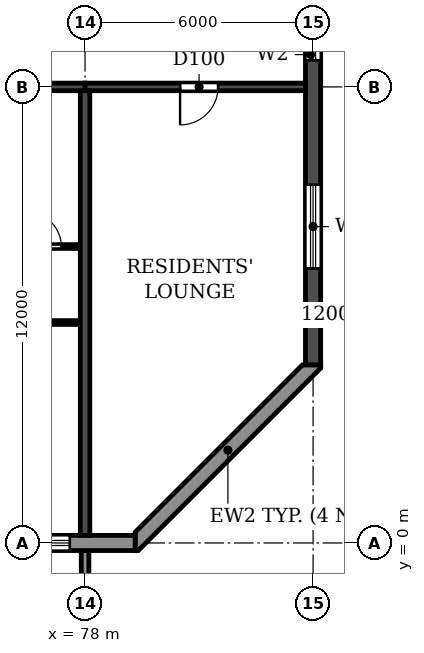
"""IFC4 building model, lengths in metres.
Left out: names, types, materials, properties, quantities, classifications, styles, units other than length and angle.
Written with IfcOpenShell. Run it as: python <this file> out.ifc"""

import sys

from ifc_helpers import new_model, si_unit, direction, frame, frame_2d, origin, place, context, subcontext, project, spatial, polyline, rectangle, outline, extrude, source, transform, mapped, element, fill, save


model = new_model("IFC4")
c1 = context("Model", 3, precision=1e-05, world=origin(), true_north=direction((0.0, 1.0)))
c2 = subcontext(c1, "Body", "Model", "MODEL_VIEW")
j1 = project(units=[si_unit("LENGTHUNIT", "METRE"), si_unit("PLANEANGLEUNIT", "RADIAN")], contexts=[c1])
p1 = place(None, origin())
s1 = spatial("IfcSite", under=j1, at=p1, CompositionType="ELEMENT")
p2 = place(p1, origin())
s2 = spatial("IfcBuilding", under=s1, at=p2, CompositionType="ELEMENT")
p3 = place(p2, frame((0.0, 0.0, 191.7)))
s3 = spatial("IfcBuildingStorey", under=s2, at=p3, CompositionType="ELEMENT", Elevation=191.7)
p4 = place(p3, frame((78.0, 0.2, 0.0), z_axis=(0.0, 0.0, 1.0), x_axis=(0.0, 1.0, 0.0)))
e1 = element("IfcWall", 1, at=p4, inside=s3, PredefinedType="SHEAR", context=c2, shape_type="SweptSolid", body=[
    extrude(rectangle(XDim=11.7, YDim=0.25, at=frame_2d((5.85, 0.0))), origin(), (0.0, 0.0, 1.0), 3.08),
])
p5 = place(p3, frame((84.0, 4.683, 0.0), z_axis=(0.0, 0.0, 1.0), x_axis=(0.0, 1.0, 0.0)))
e2 = element("IfcWall", 2, at=p5, inside=s3, PredefinedType="SHEAR", context=c2, shape_type="SweptSolid", body=[
    extrude(rectangle(XDim=31.834, YDim=0.4, at=frame_2d((15.917, 0.0))), origin(), (0.0, 0.0, 1.0), 3.08),
])
p6 = place(p5, frame((23.817, 0.0, 0.9)))
e3 = element("IfcOpeningElement", 3, at=p6, cuts=e2, PredefinedType="OPENING", context=c2, shape_type="SweptSolid", body=[
    extrude(rectangle(XDim=1.2, YDim=1.5, at=frame_2d((0.6, 0.75))), frame((0.0, 0.21, 0.0), z_axis=(0.0, -1.0, 0.0), x_axis=(1.0, 0.0, 0.0)), (0.0, 0.0, 1.0), 0.42),
])
p7 = place(p5, frame((8.017, 0.0, 0.9)))
e4 = element("IfcOpeningElement", 4, at=p7, cuts=e2, PredefinedType="OPENING", context=c2, shape_type="SweptSolid", body=[
    extrude(rectangle(XDim=1.2, YDim=1.5, at=frame_2d((0.6, 0.75))), frame((0.0, 0.21, 0.0), z_axis=(0.0, -1.0, 0.0), x_axis=(1.0, 0.0, 0.0)), (0.0, 0.0, 1.0), 0.42),
])
p8 = place(p5, frame((27.694, 0.0, 0.6)))
e5 = element("IfcOpeningElement", 5, at=p8, cuts=e2, PredefinedType="OPENING", context=c2, shape_type="SweptSolid", body=[
    extrude(rectangle(XDim=2.2, YDim=1.8, at=frame_2d((1.1, 0.9))), frame((0.0, 0.21, 0.0), z_axis=(0.0, -1.0, 0.0), x_axis=(1.0, 0.0, 0.0)), (0.0, 0.0, 1.0), 0.42),
])
p9 = place(p5, frame((2.541, 0.0, 0.6)))
e6 = element("IfcOpeningElement", 6, at=p9, cuts=e2, PredefinedType="OPENING", context=c2, shape_type="SweptSolid", body=[
    extrude(rectangle(XDim=2.2, YDim=1.8, at=frame_2d((1.1, 0.9))), frame((0.0, 0.21, 0.0), z_axis=(0.0, -1.0, 0.0), x_axis=(1.0, 0.0, 0.0)), (0.0, 0.0, 1.0), 0.42),
])
p10 = place(p5, frame((15.917, 0.0, 0.9)))
e7 = element("IfcOpeningElement", 7, at=p10, cuts=e2, PredefinedType="OPENING", context=c2, shape_type="SweptSolid", body=[
    extrude(rectangle(XDim=1.2, YDim=1.5, at=frame_2d((0.6, 0.75))), frame((0.0, 0.21, 0.0), z_axis=(0.0, -1.0, 0.0), x_axis=(1.0, 0.0, 0.0)), (0.0, 0.0, 1.0), 0.42),
])
p11 = place(p3, frame((72.0, 12.0, 0.0), z_axis=(0.0, 0.0, 1.0), x_axis=(1.0, 0.0, 0.0)))
e8 = element("IfcWall", 8, at=p11, inside=s3, PredefinedType="SHEAR", context=c2, shape_type="SweptSolid", body=[
    extrude(rectangle(XDim=6.0, YDim=0.2, at=frame_2d((3.0, 0.0))), origin(), (0.0, 0.0, 1.0), 2.48),
])
p12 = place(p11, frame((2.45, 0.0, 0.0)))
e9 = element("IfcOpeningElement", 9, at=p12, cuts=e8, PredefinedType="OPENING", context=c2, shape_type="SweptSolid", body=[
    extrude(rectangle(XDim=1.0, YDim=2.1, at=frame_2d((0.5, 1.05))), frame((0.0, 0.11, 0.0), z_axis=(0.0, -1.0, 0.0), x_axis=(1.0, 0.0, 0.0)), (0.0, 0.0, 1.0), 0.22),
])
p13 = place(p3, frame((78.0, 12.0, 0.0), z_axis=(0.0, 0.0, 1.0), x_axis=(1.0, 0.0, 0.0)))
e10 = element("IfcWall", 10, at=p13, inside=s3, PredefinedType="SHEAR", context=c2, shape_type="SweptSolid", body=[
    extrude(rectangle(XDim=5.8, YDim=0.2, at=frame_2d((2.9, 0.0))), origin(), (0.0, 0.0, 1.0), 2.48),
])
p14 = place(p13, frame((2.5, 0.0, 0.0)))
e11 = element("IfcOpeningElement", 11, at=p14, cuts=e10, PredefinedType="OPENING", context=c2, shape_type="SweptSolid", body=[
    extrude(rectangle(XDim=1.0, YDim=2.1, at=frame_2d((0.5, 1.05))), frame((0.0, 0.11, 0.0), z_axis=(0.0, -1.0, 0.0), x_axis=(1.0, 0.0, 0.0)), (0.0, 0.0, 1.0), 0.22),
])
p15 = place(p3, frame((22.683, 0.0, 0.0), z_axis=(0.0, 0.0, 1.0), x_axis=(1.0, 0.0, 0.0)))
e12 = element("IfcWall", 12, at=p15, inside=s3, PredefinedType="STANDARD", context=c2, shape_type="SweptSolid", body=[
    extrude(rectangle(XDim=56.634, YDim=0.4, at=frame_2d((28.317, 0.0))), origin(), (0.0, 0.0, 1.0), 3.08),
])
p16 = place(p15, frame((1.717, 0.0, 0.9)))
e13 = element("IfcOpeningElement", 13, at=p16, cuts=e12, PredefinedType="OPENING", context=c2, shape_type="SweptSolid", body=[
    extrude(rectangle(XDim=2.2, YDim=1.5, at=frame_2d((1.1, 0.75))), frame((0.0, 0.21, 0.0), z_axis=(0.0, -1.0, 0.0), x_axis=(1.0, 0.0, 0.0)), (0.0, 0.0, 1.0), 0.42),
])
p17 = place(p15, frame((4.917, 0.0, 0.0)))
e14 = element("IfcOpeningElement", 14, at=p17, cuts=e12, PredefinedType="OPENING", context=c2, shape_type="SweptSolid", body=[
    extrude(rectangle(XDim=1.8, YDim=2.4, at=frame_2d((0.9, 1.2))), frame((0.0, 0.21, 0.0), z_axis=(0.0, -1.0, 0.0), x_axis=(1.0, 0.0, 0.0)), (0.0, 0.0, 1.0), 0.42),
])
p18 = place(p15, frame((7.717, 0.0, 0.9)))
e15 = element("IfcOpeningElement", 15, at=p18, cuts=e12, PredefinedType="OPENING", context=c2, shape_type="SweptSolid", body=[
    extrude(rectangle(XDim=2.2, YDim=1.5, at=frame_2d((1.1, 0.75))), frame((0.0, 0.21, 0.0), z_axis=(0.0, -1.0, 0.0), x_axis=(1.0, 0.0, 0.0)), (0.0, 0.0, 1.0), 0.42),
])
p19 = place(p15, frame((10.717, 0.0, 0.9)))
e16 = element("IfcOpeningElement", 16, at=p19, cuts=e12, PredefinedType="OPENING", context=c2, shape_type="SweptSolid", body=[
    extrude(rectangle(XDim=2.2, YDim=1.5, at=frame_2d((1.1, 0.75))), frame((0.0, 0.21, 0.0), z_axis=(0.0, -1.0, 0.0), x_axis=(1.0, 0.0, 0.0)), (0.0, 0.0, 1.0), 0.42),
])
p20 = place(p15, frame((13.717, 0.0, 0.9)))
e17 = element("IfcOpeningElement", 17, at=p20, cuts=e12, PredefinedType="OPENING", context=c2, shape_type="SweptSolid", body=[
    extrude(rectangle(XDim=2.2, YDim=1.5, at=frame_2d((1.1, 0.75))), frame((0.0, 0.21, 0.0), z_axis=(0.0, -1.0, 0.0), x_axis=(1.0, 0.0, 0.0)), (0.0, 0.0, 1.0), 0.42),
])
p21 = place(p15, frame((16.917, 0.0, 0.0)))
e18 = element("IfcOpeningElement", 18, at=p21, cuts=e12, PredefinedType="OPENING", context=c2, shape_type="SweptSolid", body=[
    extrude(rectangle(XDim=1.8, YDim=2.4, at=frame_2d((0.9, 1.2))), frame((0.0, 0.21, 0.0), z_axis=(0.0, -1.0, 0.0), x_axis=(1.0, 0.0, 0.0)), (0.0, 0.0, 1.0), 0.42),
])
p22 = place(p15, frame((19.717, 0.0, 0.9)))
e19 = element("IfcOpeningElement", 19, at=p22, cuts=e12, PredefinedType="OPENING", context=c2, shape_type="SweptSolid", body=[
    extrude(rectangle(XDim=2.2, YDim=1.5, at=frame_2d((1.1, 0.75))), frame((0.0, 0.21, 0.0), z_axis=(0.0, -1.0, 0.0), x_axis=(1.0, 0.0, 0.0)), (0.0, 0.0, 1.0), 0.42),
])
p23 = place(p15, frame((22.717, 0.0, 0.9)))
e20 = element("IfcOpeningElement", 20, at=p23, cuts=e12, PredefinedType="OPENING", context=c2, shape_type="SweptSolid", body=[
    extrude(rectangle(XDim=2.2, YDim=1.5, at=frame_2d((1.1, 0.75))), frame((0.0, 0.21, 0.0), z_axis=(0.0, -1.0, 0.0), x_axis=(1.0, 0.0, 0.0)), (0.0, 0.0, 1.0), 0.42),
])
p24 = place(p15, frame((25.917, 0.0, 0.0)))
e21 = element("IfcOpeningElement", 21, at=p24, cuts=e12, PredefinedType="OPENING", context=c2, shape_type="SweptSolid", body=[
    extrude(rectangle(XDim=1.8, YDim=2.4, at=frame_2d((0.9, 1.2))), frame((0.0, 0.21, 0.0), z_axis=(0.0, -1.0, 0.0), x_axis=(1.0, 0.0, 0.0)), (0.0, 0.0, 1.0), 0.42),
])
p25 = place(p15, frame((28.717, 0.0, 0.9)))
e22 = element("IfcOpeningElement", 22, at=p25, cuts=e12, PredefinedType="OPENING", context=c2, shape_type="SweptSolid", body=[
    extrude(rectangle(XDim=2.2, YDim=1.5, at=frame_2d((1.1, 0.75))), frame((0.0, 0.21, 0.0), z_axis=(0.0, -1.0, 0.0), x_axis=(1.0, 0.0, 0.0)), (0.0, 0.0, 1.0), 0.42),
])
p26 = place(p15, frame((31.717, 0.0, 0.9)))
e23 = element("IfcOpeningElement", 23, at=p26, cuts=e12, PredefinedType="OPENING", context=c2, shape_type="SweptSolid", body=[
    extrude(rectangle(XDim=2.2, YDim=1.5, at=frame_2d((1.1, 0.75))), frame((0.0, 0.21, 0.0), z_axis=(0.0, -1.0, 0.0), x_axis=(1.0, 0.0, 0.0)), (0.0, 0.0, 1.0), 0.42),
])
p27 = place(p15, frame((34.717, 0.0, 0.9)))
e24 = element("IfcOpeningElement", 24, at=p27, cuts=e12, PredefinedType="OPENING", context=c2, shape_type="SweptSolid", body=[
    extrude(rectangle(XDim=2.2, YDim=1.5, at=frame_2d((1.1, 0.75))), frame((0.0, 0.21, 0.0), z_axis=(0.0, -1.0, 0.0), x_axis=(1.0, 0.0, 0.0)), (0.0, 0.0, 1.0), 0.42),
])
p28 = place(p15, frame((37.717, 0.0, 0.9)))
e25 = element("IfcOpeningElement", 25, at=p28, cuts=e12, PredefinedType="OPENING", context=c2, shape_type="SweptSolid", body=[
    extrude(rectangle(XDim=2.2, YDim=1.5, at=frame_2d((1.1, 0.75))), frame((0.0, 0.21, 0.0), z_axis=(0.0, -1.0, 0.0), x_axis=(1.0, 0.0, 0.0)), (0.0, 0.0, 1.0), 0.42),
])
p29 = place(p15, frame((40.917, 0.0, 0.0)))
e26 = element("IfcOpeningElement", 26, at=p29, cuts=e12, PredefinedType="OPENING", context=c2, shape_type="SweptSolid", body=[
    extrude(rectangle(XDim=1.8, YDim=2.4, at=frame_2d((0.9, 1.2))), frame((0.0, 0.21, 0.0), z_axis=(0.0, -1.0, 0.0), x_axis=(1.0, 0.0, 0.0)), (0.0, 0.0, 1.0), 0.42),
])
p30 = place(p15, frame((43.717, 0.0, 0.9)))
e27 = element("IfcOpeningElement", 27, at=p30, cuts=e12, PredefinedType="OPENING", context=c2, shape_type="SweptSolid", body=[
    extrude(rectangle(XDim=2.2, YDim=1.5, at=frame_2d((1.1, 0.75))), frame((0.0, 0.21, 0.0), z_axis=(0.0, -1.0, 0.0), x_axis=(1.0, 0.0, 0.0)), (0.0, 0.0, 1.0), 0.42),
])
p31 = place(p15, frame((46.717, 0.0, 0.9)))
e28 = element("IfcOpeningElement", 28, at=p31, cuts=e12, PredefinedType="OPENING", context=c2, shape_type="SweptSolid", body=[
    extrude(rectangle(XDim=2.2, YDim=1.5, at=frame_2d((1.1, 0.75))), frame((0.0, 0.21, 0.0), z_axis=(0.0, -1.0, 0.0), x_axis=(1.0, 0.0, 0.0)), (0.0, 0.0, 1.0), 0.42),
])
p32 = place(p15, frame((49.917, 0.0, 0.0)))
e29 = element("IfcOpeningElement", 29, at=p32, cuts=e12, PredefinedType="OPENING", context=c2, shape_type="SweptSolid", body=[
    extrude(rectangle(XDim=1.8, YDim=2.4, at=frame_2d((0.9, 1.2))), frame((0.0, 0.21, 0.0), z_axis=(0.0, -1.0, 0.0), x_axis=(1.0, 0.0, 0.0)), (0.0, 0.0, 1.0), 0.42),
])
p33 = place(p15, frame((52.717, 0.0, 0.9)))
e30 = element("IfcOpeningElement", 30, at=p33, cuts=e12, PredefinedType="OPENING", context=c2, shape_type="SweptSolid", body=[
    extrude(rectangle(XDim=2.2, YDim=1.5, at=frame_2d((1.1, 0.75))), frame((0.0, 0.21, 0.0), z_axis=(0.0, -1.0, 0.0), x_axis=(1.0, 0.0, 0.0)), (0.0, 0.0, 1.0), 0.42),
])
p34 = place(p3, origin())
e31 = element("IfcWall", 31, at=p34, inside=s3, PredefinedType="STANDARD", context=c2, shape_type="SweptSolid", body=[
    extrude(outline(polyline([(79.317, -0.2), (79.4, -0.2), (84.2, 4.6), (84.2, 4.683), (83.717, 4.683), (79.317, 0.283), (79.317, -0.2)])), origin(), (0.0, 0.0, 1.0), 3.08),
])
m1 = source(origin(), c2, "Body", "SweptSolid", [
    extrude(outline(polyline([(0.0, 0.0), (0.2, 0.0), (0.2, 1.65), (0.0, 1.65), (0.0, 0.0)])), origin(), (0.0, 0.0, 1.0), 3.1),
])
p35 = place(p3, frame((77.9, -1.85, 0.0)))
e32 = element("IfcWall", 32, at=p35, inside=s3, PredefinedType="STANDARD", context=c2, shape_type="MappedRepresentation", body=[
    mapped(m1, transform((0.0, 0.0, 0.0))),
])
p36 = place(p3, frame((74.95, 5.8, 0.0), z_axis=(0.0, 0.0, 1.0), x_axis=(1.0, 0.0, 0.0)))
e33 = element("IfcWall", 33, at=p36, inside=s3, PredefinedType="PARTITIONING", context=c2, shape_type="SweptSolid", body=[
    extrude(rectangle(XDim=2.915, YDim=0.1, at=frame_2d((1.458, 0.0))), origin(), (0.0, 0.0, 1.0), 3.08),
])
p37 = place(p36, frame((0.55, 0.0, 0.0)))
e34 = element("IfcOpeningElement", 34, at=p37, cuts=e33, PredefinedType="OPENING", context=c2, shape_type="SweptSolid", body=[
    extrude(rectangle(XDim=0.9, YDim=2.1, at=frame_2d((0.45, 1.05))), frame((0.0, 0.06, 0.0), z_axis=(0.0, -1.0, 0.0), x_axis=(1.0, 0.0, 0.0)), (0.0, 0.0, 1.0), 0.12),
])
p38 = place(p3, frame((75.8, 7.8, 0.0), z_axis=(0.0, 0.0, 1.0), x_axis=(1.0, 0.0, 0.0)))
e35 = element("IfcWall", 35, at=p38, inside=s3, PredefinedType="PARTITIONING", context=c2, shape_type="SweptSolid", body=[
    extrude(rectangle(XDim=2.065, YDim=0.1, at=frame_2d((1.032, 0.0))), origin(), (0.0, 0.0, 1.0), 3.08),
])
p39 = place(p38, frame((0.675, 0.0, 0.0)))
e36 = element("IfcOpeningElement", 36, at=p39, cuts=e35, PredefinedType="OPENING", context=c2, shape_type="SweptSolid", body=[
    extrude(rectangle(XDim=0.9, YDim=2.1, at=frame_2d((0.45, 1.05))), frame((0.0, 0.06, 0.0), z_axis=(0.0, -1.0, 0.0), x_axis=(1.0, 0.0, 0.0)), (0.0, 0.0, 1.0), 0.12),
])
p40 = place(p33, origin())
e37 = element("IfcWindow", 37, at=p40, inside=s3, PartitioningType="DOUBLE_PANEL_HORIZONTAL", PredefinedType="WINDOW", context=c2, shape_type="SweptSolid", body=[
    extrude(rectangle(XDim=2.2, YDim=1.5, at=frame_2d((1.1, 0.75))), frame((0.0, 0.03, 0.0), z_axis=(0.0, -1.0, 0.0), x_axis=(1.0, 0.0, 0.0)), (0.0, 0.0, 1.0), 0.06),
])
fill(e30, e37)
p41 = place(p7, origin())
e38 = element("IfcWindow", 38, at=p41, inside=s3, PartitioningType="SINGLE_PANEL", PredefinedType="WINDOW", context=c2, shape_type="SweptSolid", body=[
    extrude(rectangle(XDim=1.2, YDim=1.5, at=frame_2d((0.6, 0.75))), frame((0.0, 0.03, 0.0), z_axis=(0.0, -1.0, 0.0), x_axis=(1.0, 0.0, 0.0)), (0.0, 0.0, 1.0), 0.06),
])
fill(e4, e38)
p42 = place(p9, origin())
e39 = element("IfcWindow", 39, at=p42, inside=s3, PartitioningType="DOUBLE_PANEL_HORIZONTAL", PredefinedType="WINDOW", context=c2, shape_type="SweptSolid", body=[
    extrude(rectangle(XDim=2.2, YDim=1.8, at=frame_2d((1.1, 0.9))), frame((0.0, 0.03, 0.0), z_axis=(0.0, -1.0, 0.0), x_axis=(1.0, 0.0, 0.0)), (0.0, 0.0, 1.0), 0.06),
])
fill(e6, e39)
p43 = place(p39, origin())
e40 = element("IfcDoor", 40, at=p43, inside=s3, OperationType="SINGLE_SWING_LEFT", PredefinedType="DOOR", context=c2, shape_type="SweptSolid", body=[
    extrude(rectangle(XDim=0.9, YDim=2.1, at=frame_2d((0.45, 1.05))), frame((0.0, 0.025, 0.0), z_axis=(0.0, -1.0, 0.0), x_axis=(1.0, 0.0, 0.0)), (0.0, 0.0, 1.0), 0.05),
])
fill(e36, e40)
p44 = place(p14, frame((1.0, 0.0, 0.0), z_axis=(0.0, 0.0, 1.0), x_axis=(-1.0, 0.0, 0.0)))
e41 = element("IfcDoor", 41, at=p44, inside=s3, OperationType="SINGLE_SWING_RIGHT", PredefinedType="DOOR", context=c2, shape_type="SweptSolid", body=[
    extrude(rectangle(XDim=1.0, YDim=2.1, at=frame_2d((0.5, 1.05))), frame((0.0, 0.025, 0.0), z_axis=(0.0, -1.0, 0.0), x_axis=(1.0, 0.0, 0.0)), (0.0, 0.0, 1.0), 0.05),
])
fill(e11, e41)
save(model, sys.argv[1])
